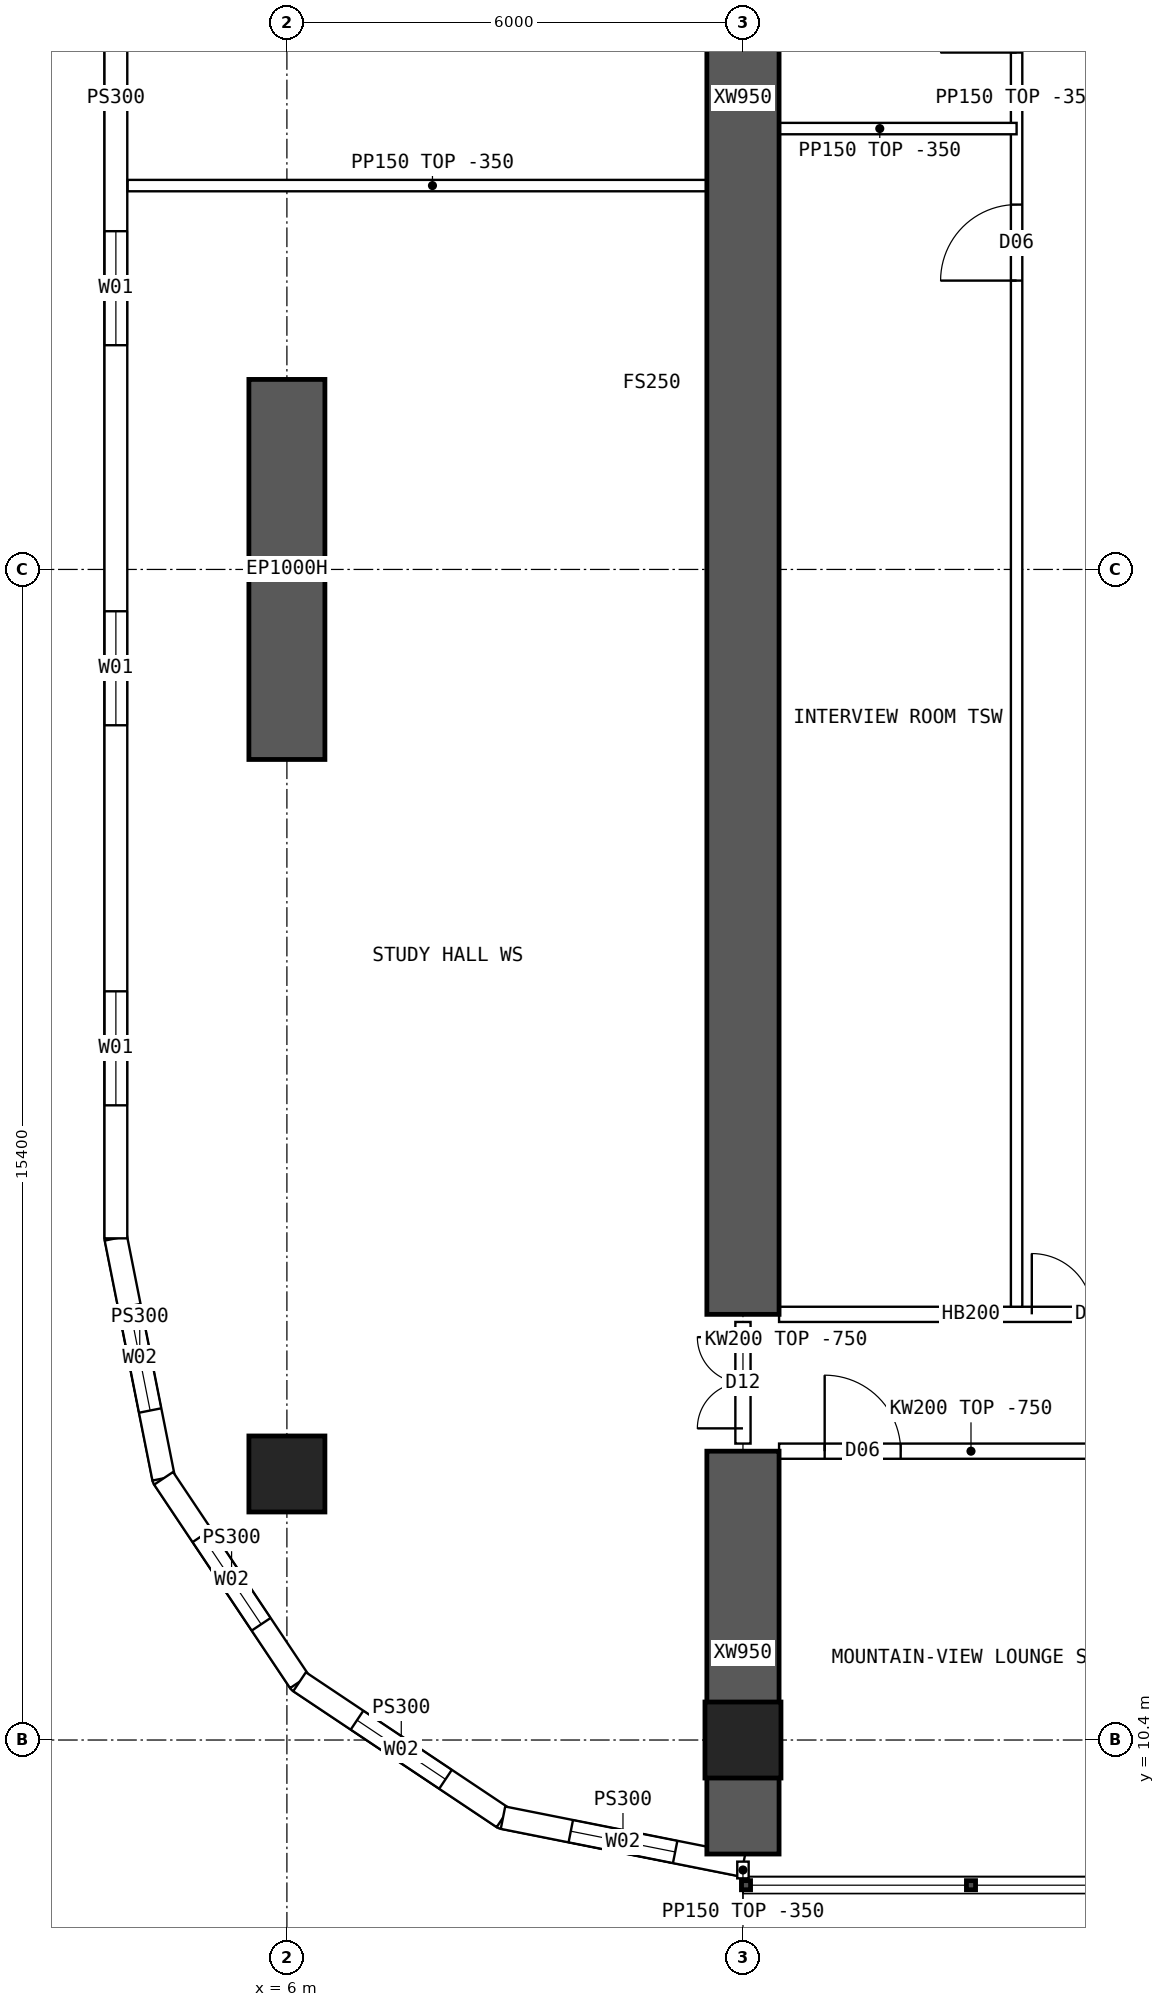
"""IFC4 building model, lengths in metres.
Left out: names, types, materials, properties, quantities, classifications, styles, units other than length and angle.
Written with IfcOpenShell. Run it as: python <this file> out.ifc"""

import sys

from ifc_helpers import new_model, si_unit, direction, frame, frame_2d, origin, origin_2d, place, context, subcontext, project, spatial, polyline, rectangle, hollow_rectangle, outline, extrude, element, fill, save


model = new_model("IFC4")
c1 = context("Model", 3, precision=1e-05, world=origin(), true_north=direction((0.0, 1.0)))
c2 = subcontext(c1, "Body", "Model", "MODEL_VIEW")
j1 = project(units=[si_unit("LENGTHUNIT", "METRE"), si_unit("PLANEANGLEUNIT", "RADIAN")], contexts=[c1])
p1 = place(None, origin())
s1 = spatial("IfcSite", under=j1, at=p1, CompositionType="ELEMENT")
p2 = place(p1, origin())
s2 = spatial("IfcBuilding", under=s1, at=p2, CompositionType="ELEMENT")
p3 = place(p2, frame((0.0, 0.0, 129.4)))
s3 = spatial("IfcBuildingStorey", under=s2, at=p3, CompositionType="ELEMENT", Elevation=129.4)
for number, where, z_axis, x_axis in (
    (1, (12.0, 10.4, 0.0), (0.0, 0.0, 1.0), (1.0, 0.0, 0.0)),
    (2, (6.0, 13.9, 0.0), (0.0, 0.0, 1.0), (1.0, 0.0, 0.0)),
):
    element("IfcColumn", number, at=place(p3, frame(where, z_axis=z_axis, x_axis=x_axis)), inside=s3, PredefinedType="COLUMN", context=c2, shape_type="SweptSolid", body=[
        extrude(hollow_rectangle(XDim=1.0, YDim=1.0, WallThickness=0.1, at=origin_2d()), origin(), (0.0, 0.0, 1.0), 3.75),
    ])
p4 = place(p3, frame((6.0, 23.3, 0.0), z_axis=(0.0, 0.0, 1.0), x_axis=(0.0, 1.0, 0.0)))
e3 = element("IfcWall", 3, at=p4, inside=s3, PredefinedType="SHEAR", context=c2, shape_type="SweptSolid", body=[
    extrude(rectangle(XDim=5.0, YDim=1.0, at=frame_2d((2.5, 0.0))), origin(), (0.0, 0.0, 1.0), 3.75),
])
p5 = place(p3, frame((12.0, 8.9, 0.0), z_axis=(0.0, 0.0, 1.0), x_axis=(0.0, 1.0, 0.0)))
e4 = element("IfcWall", 4, at=p5, inside=s3, PredefinedType="SHEAR", context=c2, shape_type="SweptSolid", body=[
    extrude(rectangle(XDim=5.3, YDim=0.95, at=frame_2d((2.65, 0.0))), origin(), (0.0, 0.0, 1.0), 3.75),
])
p6 = place(p3, frame((12.0, 16.0, 0.0), z_axis=(0.0, 0.0, 1.0), x_axis=(0.0, 1.0, 0.0)))
e5 = element("IfcWall", 5, at=p6, inside=s3, PredefinedType="SHEAR", context=c2, shape_type="SweptSolid", body=[
    extrude(rectangle(XDim=32.0, YDim=0.95, at=frame_2d((16.0, 0.0))), origin(), (0.0, 0.0, 1.0), 3.75),
])
p7 = place(p3, frame((3.75, 47.0, 0.0), z_axis=(0.0, 0.0, 1.0), x_axis=(0.0, -1.0, 0.0)))
e6 = element("IfcWall", 6, at=p7, inside=s3, PredefinedType="SOLIDWALL", context=c2, shape_type="SweptSolid", body=[
    extrude(outline(polyline([(-0.015, -0.15), (30.015, -0.15), (29.985, 0.15), (0.015, 0.15), (-0.015, -0.15)])), origin(), (0.0, 0.0, 1.0), 3.4),
])
p8 = place(p7, frame((1.75, 0.0, 0.9)))
e7 = element("IfcOpeningElement", 7, at=p8, cuts=e6, PredefinedType="OPENING", context=c2, shape_type="SweptSolid", body=[
    extrude(rectangle(XDim=1.5, YDim=2.0, at=frame_2d((0.75, 1.0))), frame((0.0, 0.16, 0.0), z_axis=(0.0, -1.0, 0.0), x_axis=(1.0, 0.0, 0.0)), (0.0, 0.0, 1.0), 0.32),
])
p9 = place(p7, frame((6.75, 0.0, 0.9)))
e8 = element("IfcOpeningElement", 8, at=p9, cuts=e6, PredefinedType="OPENING", context=c2, shape_type="SweptSolid", body=[
    extrude(rectangle(XDim=1.5, YDim=2.0, at=frame_2d((0.75, 1.0))), frame((0.0, 0.16, 0.0), z_axis=(0.0, -1.0, 0.0), x_axis=(1.0, 0.0, 0.0)), (0.0, 0.0, 1.0), 0.32),
])
p10 = place(p7, frame((11.75, 0.0, 0.9)))
e9 = element("IfcOpeningElement", 9, at=p10, cuts=e6, PredefinedType="OPENING", context=c2, shape_type="SweptSolid", body=[
    extrude(rectangle(XDim=1.5, YDim=2.0, at=frame_2d((0.75, 1.0))), frame((0.0, 0.16, 0.0), z_axis=(0.0, -1.0, 0.0), x_axis=(1.0, 0.0, 0.0)), (0.0, 0.0, 1.0), 0.32),
])
p11 = place(p7, frame((16.75, 0.0, 0.9)))
e10 = element("IfcOpeningElement", 10, at=p11, cuts=e6, PredefinedType="OPENING", context=c2, shape_type="SweptSolid", body=[
    extrude(rectangle(XDim=1.5, YDim=2.0, at=frame_2d((0.75, 1.0))), frame((0.0, 0.16, 0.0), z_axis=(0.0, -1.0, 0.0), x_axis=(1.0, 0.0, 0.0)), (0.0, 0.0, 1.0), 0.32),
])
p12 = place(p7, frame((21.75, 0.0, 0.9)))
e11 = element("IfcOpeningElement", 11, at=p12, cuts=e6, PredefinedType="OPENING", context=c2, shape_type="SweptSolid", body=[
    extrude(rectangle(XDim=1.5, YDim=2.0, at=frame_2d((0.75, 1.0))), frame((0.0, 0.16, 0.0), z_axis=(0.0, -1.0, 0.0), x_axis=(1.0, 0.0, 0.0)), (0.0, 0.0, 1.0), 0.32),
])
p13 = place(p7, frame((26.75, 0.0, 0.9)))
e12 = element("IfcOpeningElement", 12, at=p13, cuts=e6, PredefinedType="OPENING", context=c2, shape_type="SweptSolid", body=[
    extrude(rectangle(XDim=1.5, YDim=2.0, at=frame_2d((0.75, 1.0))), frame((0.0, 0.16, 0.0), z_axis=(0.0, -1.0, 0.0), x_axis=(1.0, 0.0, 0.0)), (0.0, 0.0, 1.0), 0.32),
])
p14 = place(p3, frame((3.75, 17.0, 0.0), z_axis=(0.0, 0.0, 1.0), x_axis=(0.195080412259, -0.980787251524, 0.0)))
e13 = element("IfcWall", 13, at=p14, inside=s3, PredefinedType="SOLIDWALL", context=c2, shape_type="SweptSolid", body=[
    extrude(outline(polyline([(-0.015, -0.15), (3.249, -0.15), (3.189, 0.15), (0.015, 0.15), (-0.015, -0.15)])), origin(), (0.0, 0.0, 1.0), 3.4),
])
p15 = place(p14, frame((0.909, 0.0, 0.9)))
e14 = element("IfcOpeningElement", 14, at=p15, cuts=e13, PredefinedType="OPENING", context=c2, shape_type="SweptSolid", body=[
    extrude(rectangle(XDim=1.4, YDim=1.8, at=frame_2d((0.7, 0.9))), frame((0.0, 0.16, 0.0), z_axis=(0.0, -1.0, 0.0), x_axis=(1.0, 0.0, 0.0)), (0.0, 0.0, 1.0), 0.32),
])
p16 = place(p3, frame((4.378, 13.843, 0.0), z_axis=(0.0, 0.0, 1.0), x_axis=(0.555609954424, -0.831443069936, 0.0)))
e15 = element("IfcWall", 15, at=p16, inside=s3, PredefinedType="SOLIDWALL", context=c2, shape_type="SweptSolid", body=[
    extrude(outline(polyline([(-0.03, -0.15), (3.249, -0.15), (3.189, 0.15), (0.03, 0.15), (-0.03, -0.15)])), origin(), (0.0, 0.0, 1.0), 3.4),
])
p17 = place(p16, frame((0.909, 0.0, 0.9)))
e16 = element("IfcOpeningElement", 16, at=p17, cuts=e15, PredefinedType="OPENING", context=c2, shape_type="SweptSolid", body=[
    extrude(rectangle(XDim=1.4, YDim=1.8, at=frame_2d((0.7, 0.9))), frame((0.0, 0.16, 0.0), z_axis=(0.0, -1.0, 0.0), x_axis=(1.0, 0.0, 0.0)), (0.0, 0.0, 1.0), 0.32),
])
p18 = place(p3, frame((6.167, 11.167, 0.0), z_axis=(0.0, 0.0, 1.0), x_axis=(0.831443069936, -0.555609954424, 0.0)))
e17 = element("IfcWall", 17, at=p18, inside=s3, PredefinedType="SOLIDWALL", context=c2, shape_type="SweptSolid", body=[
    extrude(outline(polyline([(-0.03, -0.15), (3.249, -0.15), (3.189, 0.15), (0.03, 0.15), (-0.03, -0.15)])), origin(), (0.0, 0.0, 1.0), 3.4),
])
p19 = place(p18, frame((0.909, 0.0, 0.9)))
e18 = element("IfcOpeningElement", 18, at=p19, cuts=e17, PredefinedType="OPENING", context=c2, shape_type="SweptSolid", body=[
    extrude(rectangle(XDim=1.4, YDim=1.8, at=frame_2d((0.7, 0.9))), frame((0.0, 0.16, 0.0), z_axis=(0.0, -1.0, 0.0), x_axis=(1.0, 0.0, 0.0)), (0.0, 0.0, 1.0), 0.32),
])
p20 = place(p3, frame((8.843, 9.378, 0.0), z_axis=(0.0, 0.0, 1.0), x_axis=(0.980787251524, -0.195080412259, 0.0)))
e19 = element("IfcWall", 19, at=p20, inside=s3, PredefinedType="SOLIDWALL", context=c2, shape_type="SweptSolid", body=[
    extrude(outline(polyline([(-0.03, -0.15), (3.249, -0.15), (3.189, 0.15), (0.03, 0.15), (-0.03, -0.15)])), origin(), (0.0, 0.0, 1.0), 3.4),
])
p21 = place(p20, frame((0.909, 0.0, 0.9)))
e20 = element("IfcOpeningElement", 20, at=p21, cuts=e19, PredefinedType="OPENING", context=c2, shape_type="SweptSolid", body=[
    extrude(rectangle(XDim=1.4, YDim=1.8, at=frame_2d((0.7, 0.9))), frame((0.0, 0.16, 0.0), z_axis=(0.0, -1.0, 0.0), x_axis=(1.0, 0.0, 0.0)), (0.0, 0.0, 1.0), 0.32),
])
p22 = place(p3, frame((12.475, 14.2, 0.0), z_axis=(0.0, 0.0, 1.0), x_axis=(1.0, 0.0, 0.0)))
e21 = element("IfcWall", 21, at=p22, inside=s3, PredefinedType="SOLIDWALL", context=c2, shape_type="SweptSolid", body=[
    extrude(outline(polyline([(0.0, 0.0), (5.05, 0.0), (5.05, 3.0), (0.0, 3.0), (0.0, 0.0)])), frame((0.0, 0.1, 0.0), z_axis=(0.0, -1.0, 0.0), x_axis=(1.0, 0.0, 0.0)), (0.0, 0.0, 1.0), 0.2),
])
p23 = place(p22, frame((0.6, 0.0, 0.0)))
e22 = element("IfcOpeningElement", 22, at=p23, cuts=e21, PredefinedType="OPENING", context=c2, shape_type="SweptSolid", body=[
    extrude(rectangle(XDim=1.0, YDim=2.1, at=frame_2d((0.5, 1.05))), frame((0.0, 0.11, 0.0), z_axis=(0.0, -1.0, 0.0), x_axis=(1.0, 0.0, 0.0)), (0.0, 0.0, 1.0), 0.22),
])
p24 = place(p3, frame((12.475, 16.0, 0.0), z_axis=(0.0, 0.0, 1.0), x_axis=(1.0, 0.0, 0.0)))
e23 = element("IfcWall", 23, at=p24, inside=s3, PredefinedType="SOLIDWALL", context=c2, shape_type="SweptSolid", body=[
    extrude(rectangle(XDim=5.05, YDim=0.2, at=frame_2d((2.525, 0.0))), origin(), (0.0, 0.0, 1.0), 3.4),
])
p25 = place(p24, frame((3.325, 0.0, 0.0)))
e24 = element("IfcOpeningElement", 24, at=p25, cuts=e23, PredefinedType="OPENING", context=c2, shape_type="SweptSolid", body=[
    extrude(rectangle(XDim=1.6, YDim=2.1, at=frame_2d((0.8, 1.05))), frame((0.0, 0.11, 0.0), z_axis=(0.0, -1.0, 0.0), x_axis=(1.0, 0.0, 0.0)), (0.0, 0.0, 1.0), 0.22),
])
p26 = place(p3, frame((15.6, 16.1, 0.0), z_axis=(0.0, 0.0, 1.0), x_axis=(0.0, 1.0, 0.0)))
e25 = element("IfcWall", 25, at=p26, inside=s3, PredefinedType="PARTITIONING", context=c2, shape_type="SweptSolid", body=[
    extrude(rectangle(XDim=31.8, YDim=0.15, at=frame_2d((15.9, 0.0))), origin(), (0.0, 0.0, 1.0), 3.4),
])
p27 = place(p26, frame((13.5, 0.0, 0.0)))
e26 = element("IfcOpeningElement", 26, at=p27, cuts=e25, PredefinedType="OPENING", context=c2, shape_type="SweptSolid", body=[
    extrude(rectangle(XDim=1.0, YDim=2.1, at=frame_2d((0.5, 1.05))), frame((0.0, 0.085, 0.0), z_axis=(0.0, -1.0, 0.0), x_axis=(1.0, 0.0, 0.0)), (0.0, 0.0, 1.0), 0.17),
])
p28 = place(p26, frame((16.5, 0.0, 0.0)))
e27 = element("IfcOpeningElement", 27, at=p28, cuts=e25, PredefinedType="OPENING", context=c2, shape_type="SweptSolid", body=[
    extrude(rectangle(XDim=1.0, YDim=2.1, at=frame_2d((0.5, 1.05))), frame((0.0, 0.085, 0.0), z_axis=(0.0, -1.0, 0.0), x_axis=(1.0, 0.0, 0.0)), (0.0, 0.0, 1.0), 0.17),
])
p29 = place(p3, frame((12.0, 31.6, 0.0), z_axis=(0.0, 0.0, 1.0), x_axis=(1.0, 0.0, 0.0)))
e28 = element("IfcWall", 28, at=p29, inside=s3, PredefinedType="PARTITIONING", context=c2, shape_type="SweptSolid", body=[
    extrude(rectangle(XDim=3.6, YDim=0.15, at=frame_2d((1.8, 0.0))), origin(), (0.0, 0.0, 1.0), 3.4),
])
p30 = place(p3, frame((3.905, 30.85, 0.0), z_axis=(0.0, 0.0, 1.0), x_axis=(1.0, 0.0, 0.0)))
e29 = element("IfcWall", 29, at=p30, inside=s3, PredefinedType="PARTITIONING", context=c2, shape_type="SweptSolid", body=[
    extrude(outline(polyline([(0.0, 0.0), (8.02, 0.0), (8.02, 3.4), (2.397, 3.4), (2.395, 2.95), (1.797, 2.95), (1.795, 3.4), (0.0, 3.4), (0.0, 0.0)])), frame((0.0, 0.075, 0.0), z_axis=(0.0, -1.0, 0.0), x_axis=(1.0, 0.0, 0.0)), (0.0, 0.0, 1.0), 0.15),
])
p31 = place(p3, frame((12.0, 14.3, 0.0), z_axis=(0.0, 0.0, 1.0), x_axis=(0.0, 1.0, 0.0)))
e30 = element("IfcWall", 30, at=p31, inside=s3, PredefinedType="SOLIDWALL", context=c2, shape_type="SweptSolid", body=[
    extrude(outline(polyline([(0.0, 0.0), (1.6, 0.0), (1.6, 3.0), (0.0, 3.0), (0.0, 0.0)])), frame((0.0, 0.1, 0.0), z_axis=(0.0, -1.0, 0.0), x_axis=(1.0, 0.0, 0.0)), (0.0, 0.0, 1.0), 0.2),
])
p32 = place(p31, frame((0.2, 0.0, 0.0)))
e31 = element("IfcOpeningElement", 31, at=p32, cuts=e30, PredefinedType="OPENING", context=c2, shape_type="SweptSolid", body=[
    extrude(rectangle(XDim=1.2, YDim=2.1, at=frame_2d((0.6, 1.05))), frame((0.0, 0.11, 0.0), z_axis=(0.0, -1.0, 0.0), x_axis=(1.0, 0.0, 0.0)), (0.0, 0.0, 1.0), 0.22),
])
p33 = place(p3, frame((12.0, 8.8, 0.0), z_axis=(0.0, 0.0, 1.0), x_axis=(0.0, -1.0, 0.0)))
e32 = element("IfcWall", 32, at=p33, inside=s3, PredefinedType="PARTITIONING", context=c2, shape_type="SweptSolid", body=[
    extrude(rectangle(XDim=0.22, YDim=0.15, at=frame_2d((0.11, 0.0))), origin(), (0.0, 0.0, 1.0), 3.4),
])
p34 = place(p11, origin())
e33 = element("IfcWindow", 33, at=p34, inside=s3, PartitioningType="SINGLE_PANEL", PredefinedType="WINDOW", context=c2, shape_type="SweptSolid", body=[
    extrude(rectangle(XDim=1.5, YDim=2.0, at=frame_2d((0.75, 1.0))), frame((0.0, 0.03, 0.0), z_axis=(0.0, -1.0, 0.0), x_axis=(1.0, 0.0, 0.0)), (0.0, 0.0, 1.0), 0.06),
])
fill(e10, e33)
p35 = place(p12, origin())
e34 = element("IfcWindow", 34, at=p35, inside=s3, PartitioningType="SINGLE_PANEL", PredefinedType="WINDOW", context=c2, shape_type="SweptSolid", body=[
    extrude(rectangle(XDim=1.5, YDim=2.0, at=frame_2d((0.75, 1.0))), frame((0.0, 0.03, 0.0), z_axis=(0.0, -1.0, 0.0), x_axis=(1.0, 0.0, 0.0)), (0.0, 0.0, 1.0), 0.06),
])
fill(e11, e34)
p36 = place(p13, origin())
e35 = element("IfcWindow", 35, at=p36, inside=s3, PartitioningType="SINGLE_PANEL", PredefinedType="WINDOW", context=c2, shape_type="SweptSolid", body=[
    extrude(rectangle(XDim=1.5, YDim=2.0, at=frame_2d((0.75, 1.0))), frame((0.0, 0.03, 0.0), z_axis=(0.0, -1.0, 0.0), x_axis=(1.0, 0.0, 0.0)), (0.0, 0.0, 1.0), 0.06),
])
fill(e12, e35)
p37 = place(p15, origin())
e36 = element("IfcWindow", 36, at=p37, inside=s3, PartitioningType="SINGLE_PANEL", PredefinedType="WINDOW", context=c2, shape_type="SweptSolid", body=[
    extrude(rectangle(XDim=1.4, YDim=1.8, at=frame_2d((0.7, 0.9))), frame((0.0, 0.03, 0.0), z_axis=(0.0, -1.0, 0.0), x_axis=(1.0, 0.0, 0.0)), (0.0, 0.0, 1.0), 0.06),
])
fill(e14, e36)
p38 = place(p17, origin())
e37 = element("IfcWindow", 37, at=p38, inside=s3, PartitioningType="SINGLE_PANEL", PredefinedType="WINDOW", context=c2, shape_type="SweptSolid", body=[
    extrude(rectangle(XDim=1.4, YDim=1.8, at=frame_2d((0.7, 0.9))), frame((0.0, 0.03, 0.0), z_axis=(0.0, -1.0, 0.0), x_axis=(1.0, 0.0, 0.0)), (0.0, 0.0, 1.0), 0.06),
])
fill(e16, e37)
p39 = place(p19, origin())
e38 = element("IfcWindow", 38, at=p39, inside=s3, PartitioningType="SINGLE_PANEL", PredefinedType="WINDOW", context=c2, shape_type="SweptSolid", body=[
    extrude(rectangle(XDim=1.4, YDim=1.8, at=frame_2d((0.7, 0.9))), frame((0.0, 0.03, 0.0), z_axis=(0.0, -1.0, 0.0), x_axis=(1.0, 0.0, 0.0)), (0.0, 0.0, 1.0), 0.06),
])
fill(e18, e38)
p40 = place(p21, origin())
e39 = element("IfcWindow", 39, at=p40, inside=s3, PartitioningType="SINGLE_PANEL", PredefinedType="WINDOW", context=c2, shape_type="SweptSolid", body=[
    extrude(rectangle(XDim=1.4, YDim=1.8, at=frame_2d((0.7, 0.9))), frame((0.0, 0.03, 0.0), z_axis=(0.0, -1.0, 0.0), x_axis=(1.0, 0.0, 0.0)), (0.0, 0.0, 1.0), 0.06),
])
fill(e20, e39)
p41 = place(p25, origin())
e40 = element("IfcDoor", 40, at=p41, inside=s3, OperationType="DOUBLE_DOOR_SINGLE_SWING", PredefinedType="DOOR", context=c2, shape_type="SweptSolid", body=[
    extrude(rectangle(XDim=1.6, YDim=2.1, at=frame_2d((0.8, 1.05))), frame((0.0, 0.025, 0.0), z_axis=(0.0, -1.0, 0.0), x_axis=(1.0, 0.0, 0.0)), (0.0, 0.0, 1.0), 0.05),
])
fill(e24, e40)
p42 = place(p23, origin())
e41 = element("IfcDoor", 41, at=p42, inside=s3, OperationType="SINGLE_SWING_LEFT", PredefinedType="DOOR", context=c2, shape_type="SweptSolid", body=[
    extrude(rectangle(XDim=1.0, YDim=2.1, at=frame_2d((0.5, 1.05))), frame((0.0, 0.025, 0.0), z_axis=(0.0, -1.0, 0.0), x_axis=(1.0, 0.0, 0.0)), (0.0, 0.0, 1.0), 0.05),
])
fill(e22, e41)
p43 = place(p27, origin())
e42 = element("IfcDoor", 42, at=p43, inside=s3, OperationType="SINGLE_SWING_LEFT", PredefinedType="DOOR", context=c2, shape_type="SweptSolid", body=[
    extrude(rectangle(XDim=1.0, YDim=2.1, at=frame_2d((0.5, 1.05))), frame((0.0, 0.025, 0.0), z_axis=(0.0, -1.0, 0.0), x_axis=(1.0, 0.0, 0.0)), (0.0, 0.0, 1.0), 0.05),
])
fill(e26, e42)
p44 = place(p32, origin())
e43 = element("IfcDoor", 43, at=p44, inside=s3, OperationType="DOUBLE_DOOR_SINGLE_SWING", PredefinedType="DOOR", context=c2, shape_type="SweptSolid", body=[
    extrude(rectangle(XDim=1.2, YDim=2.1, at=frame_2d((0.6, 1.05))), frame((0.0, 0.025, 0.0), z_axis=(0.0, -1.0, 0.0), x_axis=(1.0, 0.0, 0.0)), (0.0, 0.0, 1.0), 0.05),
])
fill(e31, e43)
save(model, sys.argv[1])
